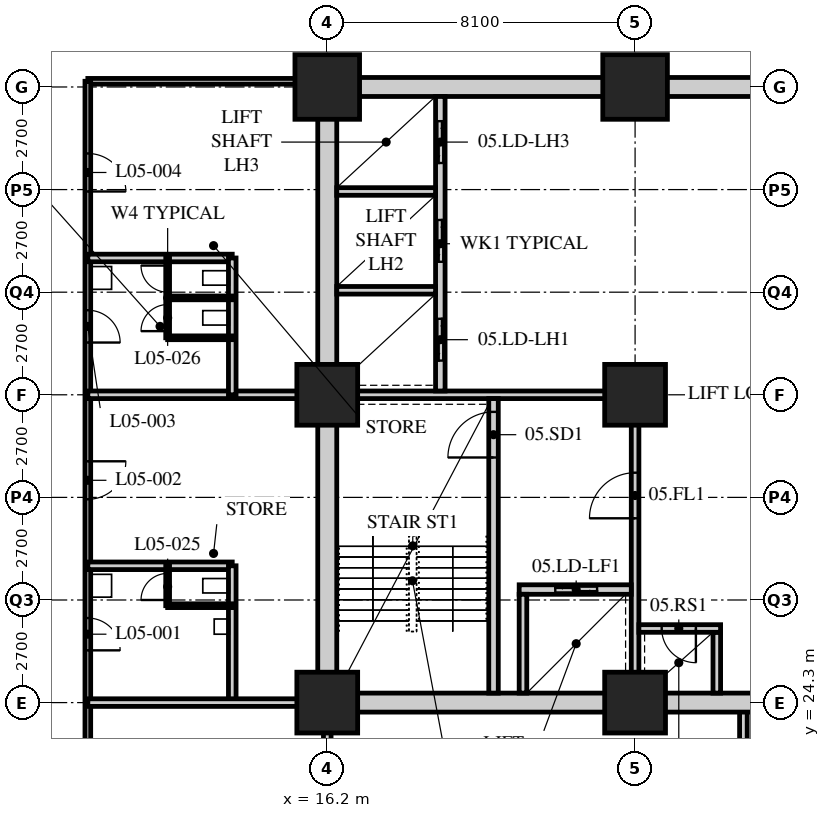
"""IFC4 building model, lengths in metres.
Left out: names, types, materials, properties, quantities, classifications, styles, units other than length and angle.
Written with IfcOpenShell. Run it as: python <this file> out.ifc"""

import sys

from ifc_helpers import new_model, si_unit, direction, frame, frame_2d, origin, origin_2d, place, context, subcontext, project, spatial, rectangle, hollow_rectangle, extrude, element, fill, save


model = new_model("IFC4")
c1 = context("Model", 3, precision=1e-05, world=origin(), true_north=direction((0.0, 1.0)))
c2 = subcontext(c1, "Body", "Model", "MODEL_VIEW")
j1 = project(units=[si_unit("LENGTHUNIT", "METRE"), si_unit("PLANEANGLEUNIT", "RADIAN")], contexts=[c1])
p1 = place(None, origin())
s1 = spatial("IfcSite", under=j1, at=p1, CompositionType="ELEMENT")
p2 = place(p1, origin())
s2 = spatial("IfcBuilding", under=s1, at=p2, CompositionType="ELEMENT")
p3 = place(p2, frame((0.0, 0.0, 27.6)))
s3 = spatial("IfcBuildingStorey", under=s2, at=p3, CompositionType="ELEMENT", Elevation=27.6)
for number, where, z_axis, x_axis in (
    (1, (16.2, 24.3, 0.0), (0.0, 0.0, 1.0), (1.0, 0.0, 0.0)),
    (2, (16.2, 32.4, 0.0), (0.0, 0.0, 1.0), (1.0, 0.0, 0.0)),
):
    element("IfcColumn", number, at=place(p3, frame(where, z_axis=z_axis, x_axis=x_axis)), inside=s3, PredefinedType="COLUMN", context=c2, shape_type="SweptSolid", body=[
        extrude(hollow_rectangle(XDim=1.6, YDim=1.6, WallThickness=0.15, at=origin_2d()), origin(), (0.0, 0.0, 1.0), 5.4),
    ])
p4 = place(p3, frame((16.2, 40.5, 0.0), z_axis=(0.0, 0.0, 1.0), x_axis=(1.0, 0.0, 0.0)))
e3 = element("IfcColumn", 3, at=p4, inside=s3, PredefinedType="COLUMN", context=c2, shape_type="SweptSolid", body=[
    extrude(hollow_rectangle(XDim=1.7, YDim=1.7, WallThickness=0.16, at=origin_2d()), origin(), (0.0, 0.0, 1.0), 5.4),
])
for number, where, z_axis, x_axis in (
    (4, (24.3, 24.3, 0.0), (0.0, 0.0, 1.0), (1.0, 0.0, 0.0)),
    (5, (24.3, 32.4, 0.0), (0.0, 0.0, 1.0), (1.0, 0.0, 0.0)),
):
    element("IfcColumn", number, at=place(p3, frame(where, z_axis=z_axis, x_axis=x_axis)), inside=s3, PredefinedType="COLUMN", context=c2, shape_type="SweptSolid", body=[
        extrude(hollow_rectangle(XDim=1.6, YDim=1.6, WallThickness=0.15, at=origin_2d()), origin(), (0.0, 0.0, 1.0), 5.4),
    ])
p5 = place(p3, frame((24.3, 40.5, 0.0), z_axis=(0.0, 0.0, 1.0), x_axis=(1.0, 0.0, 0.0)))
e6 = element("IfcColumn", 6, at=p5, inside=s3, PredefinedType="COLUMN", context=c2, shape_type="SweptSolid", body=[
    extrude(hollow_rectangle(XDim=1.7, YDim=1.7, WallThickness=0.16, at=origin_2d()), origin(), (0.0, 0.0, 1.0), 5.4),
])
p6 = place(p3, frame((16.068, 40.65, 0.0), z_axis=(0.0, 0.0, 1.0), x_axis=(-1.0, 0.0, 0.0)))
e7 = element("IfcWall", 7, at=p6, inside=s3, PredefinedType="PARTITIONING", context=c2, shape_type="SweptSolid", body=[
    extrude(rectangle(XDim=6.168, YDim=0.15, at=frame_2d((3.084, 0.0))), origin(), (0.0, 0.0, 1.0), 4.578),
])
p7 = place(p3, frame((9.9, 40.65, 0.0), z_axis=(0.0, 0.0, 1.0), x_axis=(0.0, -1.0, 0.0)))
e8 = element("IfcWall", 8, at=p7, inside=s3, PredefinedType="PARTITIONING", context=c2, shape_type="SweptSolid", body=[
    extrude(rectangle(XDim=30.75, YDim=0.15, at=frame_2d((15.375, 0.0))), origin(), (0.0, 0.0, 1.0), 5.19),
])
p8 = place(p7, frame((14.125, 0.0, 0.0)))
e9 = element("IfcOpeningElement", 9, at=p8, cuts=e8, PredefinedType="OPENING", context=c2, shape_type="SweptSolid", body=[
    extrude(rectangle(XDim=0.85, YDim=2.1, at=frame_2d((0.425, 1.05))), frame((0.0, 0.085, 0.0), z_axis=(0.0, -1.0, 0.0), x_axis=(1.0, 0.0, 0.0)), (0.0, 0.0, 1.0), 0.17),
])
p9 = place(p7, frame((10.0, 0.0, 0.0)))
e10 = element("IfcOpeningElement", 10, at=p9, cuts=e8, PredefinedType="OPENING", context=c2, shape_type="SweptSolid", body=[
    extrude(rectangle(XDim=1.0, YDim=2.1, at=frame_2d((0.5, 1.05))), frame((0.0, 0.085, 0.0), z_axis=(0.0, -1.0, 0.0), x_axis=(1.0, 0.0, 0.0)), (0.0, 0.0, 1.0), 0.17),
])
p10 = place(p7, frame((6.025, 0.0, 0.0)))
e11 = element("IfcOpeningElement", 11, at=p10, cuts=e8, PredefinedType="OPENING", context=c2, shape_type="SweptSolid", body=[
    extrude(rectangle(XDim=0.85, YDim=2.1, at=frame_2d((0.425, 1.05))), frame((0.0, 0.085, 0.0), z_axis=(0.0, -1.0, 0.0), x_axis=(1.0, 0.0, 0.0)), (0.0, 0.0, 1.0), 0.17),
])
p11 = place(p7, frame((1.9, 0.0, 0.0)))
e12 = element("IfcOpeningElement", 12, at=p11, cuts=e8, PredefinedType="OPENING", context=c2, shape_type="SweptSolid", body=[
    extrude(rectangle(XDim=1.0, YDim=2.1, at=frame_2d((0.5, 1.05))), frame((0.0, 0.085, 0.0), z_axis=(0.0, -1.0, 0.0), x_axis=(1.0, 0.0, 0.0)), (0.0, 0.0, 1.0), 0.17),
])
p12 = place(p3, frame((9.9, 32.4, 0.0), z_axis=(0.0, 0.0, 1.0), x_axis=(1.0, 0.0, 0.0)))
e13 = element("IfcWall", 13, at=p12, inside=s3, PredefinedType="SOLIDWALL", context=c2, shape_type="SweptSolid", body=[
    extrude(rectangle(XDim=6.3, YDim=0.2, at=frame_2d((3.15, 0.0))), origin(), (0.0, 0.0, 1.0), 4.578),
])
p13 = place(p3, frame((9.9, 27.9, 0.0), z_axis=(0.0, 0.0, 1.0), x_axis=(1.0, 0.0, 0.0)))
e14 = element("IfcWall", 14, at=p13, inside=s3, PredefinedType="SOLIDWALL", context=c2, shape_type="SweptSolid", body=[
    extrude(rectangle(XDim=3.8, YDim=0.2, at=frame_2d((1.9, 0.0))), origin(), (0.0, 0.0, 1.0), 5.19),
])
p14 = place(p3, frame((13.7, 24.3, 0.0), z_axis=(0.0, 0.0, 1.0), x_axis=(0.0, 1.0, 0.0)))
e15 = element("IfcWall", 15, at=p14, inside=s3, PredefinedType="SOLIDWALL", context=c2, shape_type="SweptSolid", body=[
    extrude(rectangle(XDim=3.6, YDim=0.2, at=frame_2d((1.8, 0.0))), origin(), (0.0, 0.0, 1.0), 5.19),
])
p15 = place(p3, frame((9.9, 36.0, 0.0), z_axis=(0.0, 0.0, 1.0), x_axis=(1.0, 0.0, 0.0)))
e16 = element("IfcWall", 16, at=p15, inside=s3, PredefinedType="SOLIDWALL", context=c2, shape_type="SweptSolid", body=[
    extrude(rectangle(XDim=3.8, YDim=0.2, at=frame_2d((1.9, 0.0))), origin(), (0.0, 0.0, 1.0), 5.19),
])
p16 = place(p3, frame((13.7, 32.4, 0.0), z_axis=(0.0, 0.0, 1.0), x_axis=(0.0, 1.0, 0.0)))
e17 = element("IfcWall", 17, at=p16, inside=s3, PredefinedType="SOLIDWALL", context=c2, shape_type="SweptSolid", body=[
    extrude(rectangle(XDim=3.6, YDim=0.2, at=frame_2d((1.8, 0.0))), origin(), (0.0, 0.0, 1.0), 5.19),
])
p17 = place(p3, frame((16.2, 9.9, 0.0), z_axis=(0.0, 0.0, 1.0), x_axis=(0.0, 1.0, 0.0)))
e18 = element("IfcWall", 18, at=p17, inside=s3, PredefinedType="SOLIDWALL", context=c2, shape_type="SweptSolid", body=[
    extrude(rectangle(XDim=14.4, YDim=0.2, at=frame_2d((7.2, 0.0))), origin(), (0.0, 0.0, 1.0), 4.578),
])
p18 = place(p3, frame((27.15, 9.9, 0.0), z_axis=(0.0, 0.0, 1.0), x_axis=(0.0, 1.0, 0.0)))
e19 = element("IfcWall", 19, at=p18, inside=s3, PredefinedType="SOLIDWALL", context=c2, shape_type="SweptSolid", body=[
    extrude(rectangle(XDim=14.4, YDim=0.2, at=frame_2d((7.2, 0.0))), origin(), (0.0, 0.0, 1.0), 5.19),
])
p19 = place(p3, frame((9.9, 24.3, 0.0), z_axis=(0.0, 0.0, 1.0), x_axis=(1.0, 0.0, 0.0)))
e20 = element("IfcWall", 20, at=p19, inside=s3, PredefinedType="SOLIDWALL", context=c2, shape_type="SweptSolid", body=[
    extrude(rectangle(XDim=6.3, YDim=0.2, at=frame_2d((3.15, 0.0))), origin(), (0.0, 0.0, 1.0), 4.578),
])
p20 = place(p3, frame((12.0, 26.85, 0.0), z_axis=(0.0, 0.0, 1.0), x_axis=(0.0, 1.0, 0.0)))
e21 = element("IfcWall", 21, at=p20, inside=s3, PredefinedType="PARTITIONING", context=c2, shape_type="SweptSolid", body=[
    extrude(rectangle(XDim=1.05, YDim=0.1, at=frame_2d((0.525, 0.0))), origin(), (0.0, 0.0, 1.0), 5.19),
])
p21 = place(p20, frame((0.15, 0.0, 0.0)))
e22 = element("IfcOpeningElement", 22, at=p21, cuts=e21, PredefinedType="OPENING", context=c2, shape_type="SweptSolid", body=[
    extrude(rectangle(XDim=0.7, YDim=2.0, at=frame_2d((0.35, 1.0))), frame((0.0, 0.06, 0.0), z_axis=(0.0, -1.0, 0.0), x_axis=(1.0, 0.0, 0.0)), (0.0, 0.0, 1.0), 0.12),
])
p22 = place(p3, frame((12.0, 26.85, 0.0), z_axis=(0.0, 0.0, 1.0), x_axis=(1.0, 0.0, 0.0)))
e23 = element("IfcWall", 23, at=p22, inside=s3, PredefinedType="PARTITIONING", context=c2, shape_type="SweptSolid", body=[
    extrude(rectangle(XDim=1.7, YDim=0.1, at=frame_2d((0.85, 0.0))), origin(), (0.0, 0.0, 1.0), 5.19),
])
p23 = place(p3, frame((12.0, 33.9, 0.0), z_axis=(0.0, 0.0, 1.0), x_axis=(0.0, 1.0, 0.0)))
e24 = element("IfcWall", 24, at=p23, inside=s3, PredefinedType="PARTITIONING", context=c2, shape_type="SweptSolid", body=[
    extrude(rectangle(XDim=2.1, YDim=0.1, at=frame_2d((1.05, 0.0))), origin(), (0.0, 0.0, 1.0), 5.19),
])
p24 = place(p23, frame((0.175, 0.0, 0.0)))
e25 = element("IfcOpeningElement", 25, at=p24, cuts=e24, PredefinedType="OPENING", context=c2, shape_type="SweptSolid", body=[
    extrude(rectangle(XDim=0.7, YDim=2.0, at=frame_2d((0.35, 1.0))), frame((0.0, 0.06, 0.0), z_axis=(0.0, -1.0, 0.0), x_axis=(1.0, 0.0, 0.0)), (0.0, 0.0, 1.0), 0.12),
])
p25 = place(p23, frame((1.2, 0.0, 0.0)))
e26 = element("IfcOpeningElement", 26, at=p25, cuts=e24, PredefinedType="OPENING", context=c2, shape_type="SweptSolid", body=[
    extrude(rectangle(XDim=0.7, YDim=2.0, at=frame_2d((0.35, 1.0))), frame((0.0, 0.06, 0.0), z_axis=(0.0, -1.0, 0.0), x_axis=(1.0, 0.0, 0.0)), (0.0, 0.0, 1.0), 0.12),
])
for number, where, z_axis, x_axis in (
    (27, (12.0, 33.9, 0.0), (0.0, 0.0, 1.0), (1.0, 0.0, 0.0)),
    (28, (12.0, 34.95, 0.0), (0.0, 0.0, 1.0), (1.0, 0.0, 0.0)),
):
    element("IfcWall", number, at=place(p3, frame(where, z_axis=z_axis, x_axis=x_axis)), inside=s3, PredefinedType="PARTITIONING", context=c2, shape_type="SweptSolid", body=[
        extrude(rectangle(XDim=1.7, YDim=0.1, at=frame_2d((0.85, 0.0))), origin(), (0.0, 0.0, 1.0), 5.19),
    ])
p26 = place(p3, frame((15.95, 24.3, 0.0), z_axis=(0.0, 0.0, 1.0), x_axis=(1.0, 0.0, 0.0)))
e29 = element("IfcWall", 29, at=p26, inside=s3, PredefinedType="SOLIDWALL", context=c2, shape_type="SweptSolid", body=[
    extrude(rectangle(XDim=24.8, YDim=0.5, at=frame_2d((12.4, 0.0))), origin(), (0.0, 0.0, 1.0), 4.54),
])
p27 = place(p26, frame((11.5, 0.0, 0.0)))
e30 = element("IfcOpeningElement", 30, at=p27, cuts=e29, PredefinedType="OPENING", context=c2, shape_type="SweptSolid", body=[
    extrude(rectangle(XDim=1.8, YDim=2.4, at=frame_2d((0.9, 1.2))), frame((0.0, 0.26, 0.0), z_axis=(0.0, -1.0, 0.0), x_axis=(1.0, 0.0, 0.0)), (0.0, 0.0, 1.0), 0.52),
])
p28 = place(p3, frame((15.95, 40.5, 0.0), z_axis=(0.0, 0.0, 1.0), x_axis=(1.0, 0.0, 0.0)))
e31 = element("IfcWall", 31, at=p28, inside=s3, PredefinedType="SOLIDWALL", context=c2, shape_type="SweptSolid", body=[
    extrude(rectangle(XDim=24.8, YDim=0.5, at=frame_2d((12.4, 0.0))), origin(), (0.0, 0.0, 1.0), 4.54),
])
p29 = place(p28, frame((11.5, 0.0, 0.0)))
e32 = element("IfcOpeningElement", 32, at=p29, cuts=e31, PredefinedType="OPENING", context=c2, shape_type="SweptSolid", body=[
    extrude(rectangle(XDim=1.8, YDim=2.4, at=frame_2d((0.9, 1.2))), frame((0.0, 0.26, 0.0), z_axis=(0.0, -1.0, 0.0), x_axis=(1.0, 0.0, 0.0)), (0.0, 0.0, 1.0), 0.52),
])
p30 = place(p3, frame((16.2, 24.55, 0.0), z_axis=(0.0, 0.0, 1.0), x_axis=(0.0, 1.0, 0.0)))
e33 = element("IfcWall", 33, at=p30, inside=s3, PredefinedType="SOLIDWALL", context=c2, shape_type="SweptSolid", body=[
    extrude(rectangle(XDim=15.7, YDim=0.5, at=frame_2d((7.85, 0.0))), origin(), (0.0, 0.0, 1.0), 4.578),
])
p31 = place(p3, frame((16.45, 32.4, 0.0), z_axis=(0.0, 0.0, 1.0), x_axis=(1.0, 0.0, 0.0)))
e34 = element("IfcWall", 34, at=p31, inside=s3, PredefinedType="SOLIDWALL", context=c2, shape_type="SweptSolid", body=[
    extrude(rectangle(XDim=7.95, YDim=0.2, at=frame_2d((3.975, 0.0))), origin(), (0.0, 0.0, 1.0), 4.578),
])
p32 = place(p3, frame((24.3, 24.55, 0.0), z_axis=(0.0, 0.0, 1.0), x_axis=(0.0, 1.0, 0.0)))
e35 = element("IfcWall", 35, at=p32, inside=s3, PredefinedType="SOLIDWALL", context=c2, shape_type="SweptSolid", body=[
    extrude(rectangle(XDim=7.75, YDim=0.2, at=frame_2d((3.875, 0.0))), origin(), (0.0, 0.0, 1.0), 4.578),
])
p33 = place(p32, frame((4.6, 0.0, 0.0)))
e36 = element("IfcOpeningElement", 36, at=p33, cuts=e35, PredefinedType="OPENING", context=c2, shape_type="SweptSolid", body=[
    extrude(rectangle(XDim=1.2, YDim=2.1, at=frame_2d((0.6, 1.05))), frame((0.0, 0.11, 0.0), z_axis=(0.0, -1.0, 0.0), x_axis=(1.0, 0.0, 0.0)), (0.0, 0.0, 1.0), 0.22),
])
p34 = place(p3, frame((20.575, 24.55, 0.0), z_axis=(0.0, 0.0, 1.0), x_axis=(0.0, 1.0, 0.0)))
e37 = element("IfcWall", 37, at=p34, inside=s3, PredefinedType="SOLIDWALL", context=c2, shape_type="SweptSolid", body=[
    extrude(rectangle(XDim=7.75, YDim=0.25, at=frame_2d((3.875, 0.0))), origin(), (0.0, 0.0, 1.0), 5.19),
])
p35 = place(p34, frame((6.2, 0.0, 0.0)))
e38 = element("IfcOpeningElement", 38, at=p35, cuts=e37, PredefinedType="OPENING", context=c2, shape_type="SweptSolid", body=[
    extrude(rectangle(XDim=1.2, YDim=2.1, at=frame_2d((0.6, 1.05))), frame((0.0, 0.135, 0.0), z_axis=(0.0, -1.0, 0.0), x_axis=(1.0, 0.0, 0.0)), (0.0, 0.0, 1.0), 0.27),
])
p36 = place(p3, frame((21.25, 27.275, 0.0), z_axis=(0.0, 0.0, 1.0), x_axis=(1.0, 0.0, 0.0)))
e39 = element("IfcWall", 39, at=p36, inside=s3, PredefinedType="SOLIDWALL", context=c2, shape_type="SweptSolid", body=[
    extrude(rectangle(XDim=2.95, YDim=0.25, at=frame_2d((1.475, 0.0))), origin(), (0.0, 0.0, 1.0), 5.19),
])
p37 = place(p36, frame((0.95, 0.0, 0.0)))
e40 = element("IfcOpeningElement", 40, at=p37, cuts=e39, PredefinedType="OPENING", context=c2, shape_type="SweptSolid", body=[
    extrude(rectangle(XDim=1.1, YDim=2.4, at=frame_2d((0.55, 1.2))), frame((0.0, 0.135, 0.0), z_axis=(0.0, -1.0, 0.0), x_axis=(1.0, 0.0, 0.0)), (0.0, 0.0, 1.0), 0.27),
])
p38 = place(p3, frame((21.35, 24.55, 0.0), z_axis=(0.0, 0.0, 1.0), x_axis=(0.0, 1.0, 0.0)))
e41 = element("IfcWall", 41, at=p38, inside=s3, PredefinedType="SOLIDWALL", context=c2, shape_type="SweptSolid", body=[
    extrude(rectangle(XDim=2.6, YDim=0.2, at=frame_2d((1.3, 0.0))), origin(), (0.0, 0.0, 1.0), 5.19),
])
p39 = place(p3, frame((19.175, 32.5, 0.0), z_axis=(0.0, 0.0, 1.0), x_axis=(0.0, 1.0, 0.0)))
e42 = element("IfcWall", 42, at=p39, inside=s3, PredefinedType="SOLIDWALL", context=c2, shape_type="SweptSolid", body=[
    extrude(rectangle(XDim=7.75, YDim=0.25, at=frame_2d((3.875, 0.0))), origin(), (0.0, 0.0, 1.0), 5.19),
])
p40 = place(p39, frame((0.8, 0.0, 0.0)))
e43 = element("IfcOpeningElement", 43, at=p40, cuts=e42, PredefinedType="OPENING", context=c2, shape_type="SweptSolid", body=[
    extrude(rectangle(XDim=1.1, YDim=2.4, at=frame_2d((0.55, 1.2))), frame((0.0, 0.135, 0.0), z_axis=(0.0, -1.0, 0.0), x_axis=(1.0, 0.0, 0.0)), (0.0, 0.0, 1.0), 0.27),
])
p41 = place(p39, frame((3.4, 0.0, 0.0)))
e44 = element("IfcOpeningElement", 44, at=p41, cuts=e42, PredefinedType="OPENING", context=c2, shape_type="SweptSolid", body=[
    extrude(rectangle(XDim=1.1, YDim=2.4, at=frame_2d((0.55, 1.2))), frame((0.0, 0.135, 0.0), z_axis=(0.0, -1.0, 0.0), x_axis=(1.0, 0.0, 0.0)), (0.0, 0.0, 1.0), 0.27),
])
p42 = place(p39, frame((6.0, 0.0, 0.0)))
e45 = element("IfcOpeningElement", 45, at=p42, cuts=e42, PredefinedType="OPENING", context=c2, shape_type="SweptSolid", body=[
    extrude(rectangle(XDim=1.1, YDim=2.4, at=frame_2d((0.55, 1.2))), frame((0.0, 0.135, 0.0), z_axis=(0.0, -1.0, 0.0), x_axis=(1.0, 0.0, 0.0)), (0.0, 0.0, 1.0), 0.27),
])
for number, where, z_axis, x_axis in (
    (46, (16.45, 35.15, 0.0), (0.0, 0.0, 1.0), (1.0, 0.0, 0.0)),
    (47, (16.45, 37.75, 0.0), (0.0, 0.0, 1.0), (1.0, 0.0, 0.0)),
):
    element("IfcWall", number, at=place(p3, frame(where, z_axis=z_axis, x_axis=x_axis)), inside=s3, PredefinedType="SOLIDWALL", context=c2, shape_type="SweptSolid", body=[
        extrude(rectangle(XDim=2.6, YDim=0.2, at=frame_2d((1.3, 0.0))), origin(), (0.0, 0.0, 1.0), 5.19),
    ])
p43 = place(p3, frame((26.45, 24.55, 0.0), z_axis=(0.0, 0.0, 1.0), x_axis=(0.0, 1.0, 0.0)))
e48 = element("IfcWall", 48, at=p43, inside=s3, PredefinedType="SOLIDWALL", context=c2, shape_type="SweptSolid", body=[
    extrude(rectangle(XDim=1.6, YDim=0.2, at=frame_2d((0.8, 0.0))), origin(), (0.0, 0.0, 1.0), 5.19),
])
p44 = place(p3, frame((24.4, 26.25, 0.0), z_axis=(0.0, 0.0, 1.0), x_axis=(1.0, 0.0, 0.0)))
e49 = element("IfcWall", 49, at=p44, inside=s3, PredefinedType="SOLIDWALL", context=c2, shape_type="SweptSolid", body=[
    extrude(rectangle(XDim=2.15, YDim=0.2, at=frame_2d((1.075, 0.0))), origin(), (0.0, 0.0, 1.0), 5.19),
])
p45 = place(p44, frame((0.6, 0.0, 0.0)))
e50 = element("IfcOpeningElement", 50, at=p45, cuts=e49, PredefinedType="OPENING", context=c2, shape_type="SweptSolid", body=[
    extrude(rectangle(XDim=0.9, YDim=2.1, at=frame_2d((0.45, 1.05))), frame((0.0, 0.11, 0.0), z_axis=(0.0, -1.0, 0.0), x_axis=(1.0, 0.0, 0.0)), (0.0, 0.0, 1.0), 0.22),
])
p46 = place(p8, origin())
e51 = element("IfcDoor", 51, at=p46, inside=s3, OperationType="SINGLE_SWING_RIGHT", PredefinedType="DOOR", context=c2, shape_type="SweptSolid", body=[
    extrude(rectangle(XDim=0.85, YDim=2.1, at=frame_2d((0.425, 1.05))), frame((0.0, 0.025, 0.0), z_axis=(0.0, -1.0, 0.0), x_axis=(1.0, 0.0, 0.0)), (0.0, 0.0, 1.0), 0.05),
])
fill(e9, e51)
p47 = place(p9, origin())
e52 = element("IfcDoor", 52, at=p47, inside=s3, OperationType="SINGLE_SWING_LEFT", PredefinedType="DOOR", context=c2, shape_type="SweptSolid", body=[
    extrude(rectangle(XDim=1.0, YDim=2.1, at=frame_2d((0.5, 1.05))), frame((0.0, 0.025, 0.0), z_axis=(0.0, -1.0, 0.0), x_axis=(1.0, 0.0, 0.0)), (0.0, 0.0, 1.0), 0.05),
])
fill(e10, e52)
p48 = place(p10, origin())
e53 = element("IfcDoor", 53, at=p48, inside=s3, OperationType="SINGLE_SWING_RIGHT", PredefinedType="DOOR", context=c2, shape_type="SweptSolid", body=[
    extrude(rectangle(XDim=0.85, YDim=2.1, at=frame_2d((0.425, 1.05))), frame((0.0, 0.025, 0.0), z_axis=(0.0, -1.0, 0.0), x_axis=(1.0, 0.0, 0.0)), (0.0, 0.0, 1.0), 0.05),
])
fill(e11, e53)
p49 = place(p11, origin())
e54 = element("IfcDoor", 54, at=p49, inside=s3, OperationType="SINGLE_SWING_RIGHT", PredefinedType="DOOR", context=c2, shape_type="SweptSolid", body=[
    extrude(rectangle(XDim=1.0, YDim=2.1, at=frame_2d((0.5, 1.05))), frame((0.0, 0.025, 0.0), z_axis=(0.0, -1.0, 0.0), x_axis=(1.0, 0.0, 0.0)), (0.0, 0.0, 1.0), 0.05),
])
fill(e12, e54)
p50 = place(p21, origin())
e55 = element("IfcDoor", 55, at=p50, inside=s3, OperationType="SINGLE_SWING_LEFT", PredefinedType="DOOR", context=c2, shape_type="SweptSolid", body=[
    extrude(rectangle(XDim=0.7, YDim=2.0, at=frame_2d((0.35, 1.0))), frame((0.0, 0.025, 0.0), z_axis=(0.0, -1.0, 0.0), x_axis=(1.0, 0.0, 0.0)), (0.0, 0.0, 1.0), 0.05),
])
fill(e22, e55)
p51 = place(p24, origin())
e56 = element("IfcDoor", 56, at=p51, inside=s3, OperationType="SINGLE_SWING_LEFT", PredefinedType="DOOR", context=c2, shape_type="SweptSolid", body=[
    extrude(rectangle(XDim=0.7, YDim=2.0, at=frame_2d((0.35, 1.0))), frame((0.0, 0.025, 0.0), z_axis=(0.0, -1.0, 0.0), x_axis=(1.0, 0.0, 0.0)), (0.0, 0.0, 1.0), 0.05),
])
fill(e25, e56)
p52 = place(p25, origin())
e57 = element("IfcDoor", 57, at=p52, inside=s3, OperationType="SINGLE_SWING_RIGHT", PredefinedType="DOOR", context=c2, shape_type="SweptSolid", body=[
    extrude(rectangle(XDim=0.7, YDim=2.0, at=frame_2d((0.35, 1.0))), frame((0.0, 0.025, 0.0), z_axis=(0.0, -1.0, 0.0), x_axis=(1.0, 0.0, 0.0)), (0.0, 0.0, 1.0), 0.05),
])
fill(e26, e57)
p53 = place(p35, origin())
e58 = element("IfcDoor", 58, at=p53, inside=s3, OperationType="SINGLE_SWING_LEFT", PredefinedType="DOOR", context=c2, shape_type="SweptSolid", body=[
    extrude(rectangle(XDim=1.2, YDim=2.1, at=frame_2d((0.6, 1.05))), frame((0.0, 0.025, 0.0), z_axis=(0.0, -1.0, 0.0), x_axis=(1.0, 0.0, 0.0)), (0.0, 0.0, 1.0), 0.05),
])
fill(e38, e58)
p54 = place(p33, origin())
e59 = element("IfcDoor", 59, at=p54, inside=s3, OperationType="SINGLE_SWING_LEFT", PredefinedType="DOOR", context=c2, shape_type="SweptSolid", body=[
    extrude(rectangle(XDim=1.2, YDim=2.1, at=frame_2d((0.6, 1.05))), frame((0.0, 0.025, 0.0), z_axis=(0.0, -1.0, 0.0), x_axis=(1.0, 0.0, 0.0)), (0.0, 0.0, 1.0), 0.05),
])
fill(e36, e59)
p55 = place(p45, origin())
e60 = element("IfcDoor", 60, at=p55, inside=s3, OperationType="SINGLE_SWING_LEFT", PredefinedType="DOOR", context=c2, shape_type="SweptSolid", body=[
    extrude(rectangle(XDim=0.9, YDim=2.1, at=frame_2d((0.45, 1.05))), frame((0.0, 0.025, 0.0), z_axis=(0.0, -1.0, 0.0), x_axis=(1.0, 0.0, 0.0)), (0.0, 0.0, 1.0), 0.05),
])
fill(e50, e60)
p56 = place(p40, origin())
e61 = element("IfcDoor", 61, at=p56, inside=s3, OperationType="DOUBLE_DOOR_SLIDING", PredefinedType="DOOR", context=c2, shape_type="SweptSolid", body=[
    extrude(rectangle(XDim=1.1, YDim=2.4, at=frame_2d((0.55, 1.2))), frame((0.0, 0.025, 0.0), z_axis=(0.0, -1.0, 0.0), x_axis=(1.0, 0.0, 0.0)), (0.0, 0.0, 1.0), 0.05),
])
fill(e43, e61)
p57 = place(p41, origin())
e62 = element("IfcDoor", 62, at=p57, inside=s3, OperationType="DOUBLE_DOOR_SLIDING", PredefinedType="DOOR", context=c2, shape_type="SweptSolid", body=[
    extrude(rectangle(XDim=1.1, YDim=2.4, at=frame_2d((0.55, 1.2))), frame((0.0, 0.025, 0.0), z_axis=(0.0, -1.0, 0.0), x_axis=(1.0, 0.0, 0.0)), (0.0, 0.0, 1.0), 0.05),
])
fill(e44, e62)
p58 = place(p42, origin())
e63 = element("IfcDoor", 63, at=p58, inside=s3, OperationType="DOUBLE_DOOR_SLIDING", PredefinedType="DOOR", context=c2, shape_type="SweptSolid", body=[
    extrude(rectangle(XDim=1.1, YDim=2.4, at=frame_2d((0.55, 1.2))), frame((0.0, 0.025, 0.0), z_axis=(0.0, -1.0, 0.0), x_axis=(1.0, 0.0, 0.0)), (0.0, 0.0, 1.0), 0.05),
])
fill(e45, e63)
p59 = place(p37, origin())
e64 = element("IfcDoor", 64, at=p59, inside=s3, OperationType="DOUBLE_DOOR_SLIDING", PredefinedType="DOOR", context=c2, shape_type="SweptSolid", body=[
    extrude(rectangle(XDim=1.1, YDim=2.4, at=frame_2d((0.55, 1.2))), frame((0.0, 0.025, 0.0), z_axis=(0.0, -1.0, 0.0), x_axis=(1.0, 0.0, 0.0)), (0.0, 0.0, 1.0), 0.05),
])
fill(e40, e64)
save(model, sys.argv[1])
